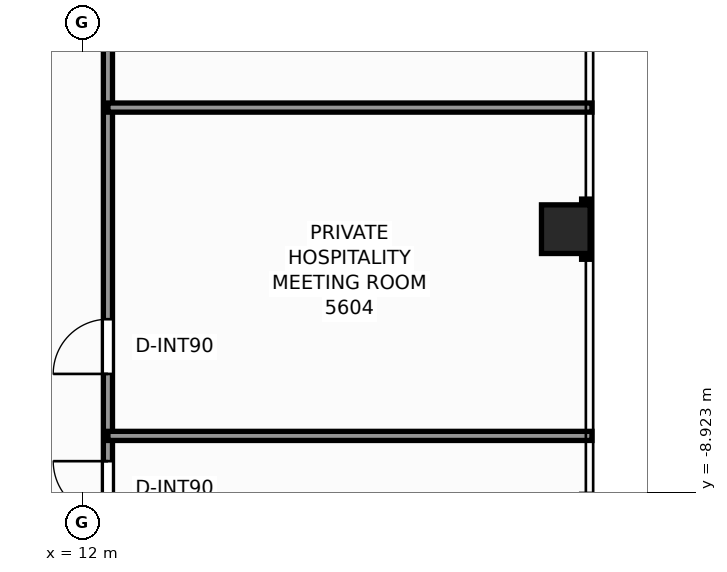
"""IFC4 building model, lengths in metres.
Left out: names, types, materials, properties, quantities, classifications, styles, units other than length and angle.
Written with IfcOpenShell. Run it as: python <this file> out.ifc"""

import sys

from ifc_helpers import new_model, si_unit, direction, frame, frame_2d, origin, origin_2d, place, context, subcontext, project, spatial, rectangle, extrude, element, fill, save


model = new_model("IFC4")
c1 = context("Model", 3, precision=1e-05, world=origin(), true_north=direction((0.0, 1.0)))
c2 = subcontext(c1, "Body", "Model", "MODEL_VIEW")
j1 = project(units=[si_unit("LENGTHUNIT", "METRE"), si_unit("PLANEANGLEUNIT", "RADIAN")], contexts=[c1])
p1 = place(None, origin())
s1 = spatial("IfcSite", under=j1, at=p1, CompositionType="ELEMENT")
p2 = place(p1, origin())
s2 = spatial("IfcBuilding", under=s1, at=p2, CompositionType="ELEMENT")
p3 = place(p2, frame((0.0, 0.0, 193.2)))
s3 = spatial("IfcBuildingStorey", under=s2, at=p3, CompositionType="ELEMENT", Elevation=193.2)
p4 = place(p3, frame((19.95, -4.6, 0.0), z_axis=(0.0, 0.0, 1.0), x_axis=(1.0, 0.0, 0.0)))
e1 = element("IfcColumn", 1, at=p4, inside=s3, PredefinedType="COLUMN", context=c2, shape_type="SweptSolid", body=[
    extrude(rectangle(XDim=0.8, YDim=0.8, at=origin_2d()), origin(), (0.0, 0.0, 1.0), 3.3),
])
p5 = place(p3, frame((12.42, -12.26, 0.0), z_axis=(0.0, 0.0, 1.0), x_axis=(0.0, 1.0, 0.0)))
e2 = element("IfcWall", 2, at=p5, inside=s3, PredefinedType="PARTITIONING", context=c2, shape_type="SweptSolid", body=[
    extrude(rectangle(XDim=24.84, YDim=0.15, at=frame_2d((12.42, 0.0))), origin(), (0.0, 0.0, 1.0), 2.369),
])
p6 = place(p5, frame((2.944, 0.0, 0.0)))
e3 = element("IfcOpeningElement", 3, at=p6, cuts=e2, PredefinedType="OPENING", context=c2, shape_type="SweptSolid", body=[
    extrude(rectangle(XDim=0.9, YDim=2.06, at=frame_2d((0.45, 1.03))), frame((0.0, 0.085, 0.0), z_axis=(0.0, -1.0, 0.0), x_axis=(1.0, 0.0, 0.0)), (0.0, 0.0, 1.0), 0.17),
])
p7 = place(p5, frame((5.279, 0.0, 0.0)))
e4 = element("IfcOpeningElement", 4, at=p7, cuts=e2, PredefinedType="OPENING", context=c2, shape_type="SweptSolid", body=[
    extrude(rectangle(XDim=0.9, YDim=2.06, at=frame_2d((0.45, 1.03))), frame((0.0, 0.085, 0.0), z_axis=(0.0, -1.0, 0.0), x_axis=(1.0, 0.0, 0.0)), (0.0, 0.0, 1.0), 0.17),
])
p8 = place(p5, frame((13.602, 0.0, 0.0)))
e5 = element("IfcOpeningElement", 5, at=p8, cuts=e2, PredefinedType="OPENING", context=c2, shape_type="SweptSolid", body=[
    extrude(rectangle(XDim=0.9, YDim=2.06, at=frame_2d((0.45, 1.03))), frame((0.0, 0.085, 0.0), z_axis=(0.0, -1.0, 0.0), x_axis=(1.0, 0.0, 0.0)), (0.0, 0.0, 1.0), 0.17),
])
p9 = place(p5, frame((19.098, 0.0, 0.0)))
e6 = element("IfcOpeningElement", 6, at=p9, cuts=e2, PredefinedType="OPENING", context=c2, shape_type="SweptSolid", body=[
    extrude(rectangle(XDim=0.95, YDim=2.06, at=frame_2d((0.475, 1.03))), frame((0.0, 0.085, 0.0), z_axis=(0.0, -1.0, 0.0), x_axis=(1.0, 0.0, 0.0)), (0.0, 0.0, 1.0), 0.17),
])
p10 = place(p5, frame((20.836, 0.0, 0.0)))
e7 = element("IfcOpeningElement", 7, at=p10, cuts=e2, PredefinedType="OPENING", context=c2, shape_type="SweptSolid", body=[
    extrude(rectangle(XDim=0.9, YDim=2.06, at=frame_2d((0.45, 1.03))), frame((0.0, 0.085, 0.0), z_axis=(0.0, -1.0, 0.0), x_axis=(1.0, 0.0, 0.0)), (0.0, 0.0, 1.0), 0.17),
])
for number, where, z_axis, x_axis in (
    (8, (12.42, -8.0, 0.0), (0.0, 0.0, 1.0), (1.0, 0.0, 0.0)),
    (9, (12.42, -2.6, 0.0), (0.0, 0.0, 1.0), (1.0, 0.0, 0.0)),
):
    element("IfcWall", number, at=place(p3, frame(where, z_axis=z_axis, x_axis=x_axis)), inside=s3, PredefinedType="PARTITIONING", context=c2, shape_type="SweptSolid", body=[
        extrude(rectangle(XDim=7.96, YDim=0.15, at=frame_2d((3.98, 0.0))), origin(), (0.0, 0.0, 1.0), 2.453),
    ])
p11 = place(p6, origin())
e10 = element("IfcDoor", 10, at=p11, inside=s3, OperationType="SINGLE_SWING_RIGHT", PredefinedType="DOOR", context=c2, shape_type="SweptSolid", body=[
    extrude(rectangle(XDim=0.9, YDim=2.06, at=frame_2d((0.45, 1.03))), frame((0.0, 0.025, 0.0), z_axis=(0.0, -1.0, 0.0), x_axis=(1.0, 0.0, 0.0)), (0.0, 0.0, 1.0), 0.05),
])
fill(e3, e10)
p12 = place(p7, origin())
e11 = element("IfcDoor", 11, at=p12, inside=s3, OperationType="SINGLE_SWING_LEFT", PredefinedType="DOOR", context=c2, shape_type="SweptSolid", body=[
    extrude(rectangle(XDim=0.9, YDim=2.06, at=frame_2d((0.45, 1.03))), frame((0.0, 0.025, 0.0), z_axis=(0.0, -1.0, 0.0), x_axis=(1.0, 0.0, 0.0)), (0.0, 0.0, 1.0), 0.05),
])
fill(e4, e11)
save(model, sys.argv[1])
